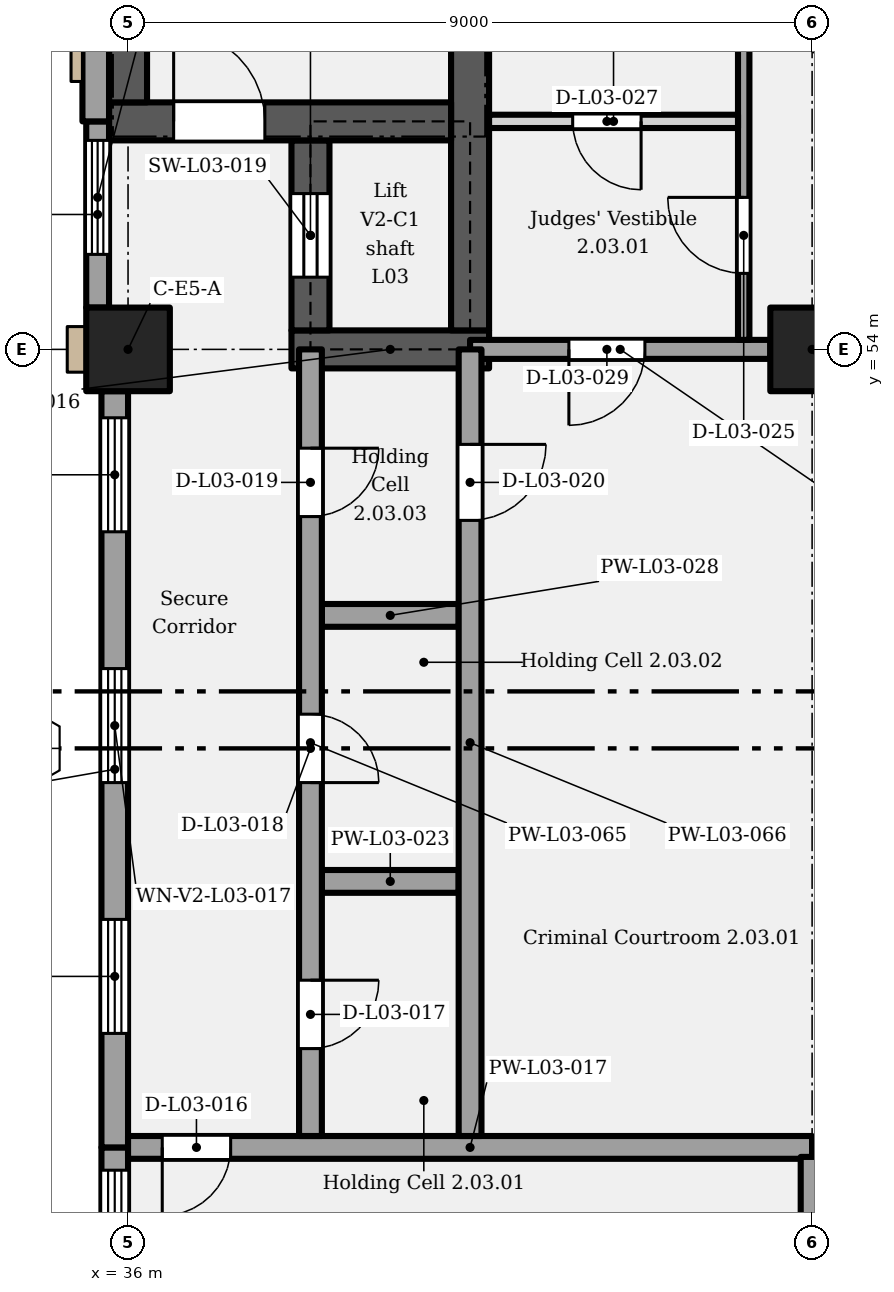
"""IFC4 building model, lengths in metres.
Left out: names, types, materials, properties, quantities, classifications, styles, units other than length and angle.
Written with IfcOpenShell. Run it as: python <this file> out.ifc"""

import sys

from ifc_helpers import new_model, si_unit, direction, frame, frame_2d, origin, origin_2d, place, context, subcontext, project, spatial, rectangle, extrude, element, fill, save


model = new_model("IFC4")
c1 = context("Model", 3, precision=1e-05, world=origin(), true_north=direction((0.0, 1.0)))
c2 = subcontext(c1, "Body", "Model", "MODEL_VIEW")
j1 = project(units=[si_unit("LENGTHUNIT", "METRE"), si_unit("PLANEANGLEUNIT", "RADIAN")], contexts=[c1])
p1 = place(None, origin())
s1 = spatial("IfcSite", under=j1, at=p1, CompositionType="ELEMENT")
p2 = place(p1, origin())
s2 = spatial("IfcBuilding", under=s1, at=p2, CompositionType="ELEMENT")
p3 = place(p2, frame((0.0, 0.0, 17.4)))
s3 = spatial("IfcBuildingStorey", under=s2, at=p3, CompositionType="ELEMENT", Elevation=17.4)
for number, where, z_axis, x_axis in (
    (1, (36.0, 54.0, 0.0), (0.0, 0.0, 1.0), (1.0, 0.0, 0.0)),
    (2, (45.0, 54.0, 0.0), (0.0, 0.0, 1.0), (1.0, 0.0, 0.0)),
):
    element("IfcColumn", number, at=place(p3, frame(where, z_axis=z_axis, x_axis=x_axis)), inside=s3, PredefinedType="COLUMN", context=c2, shape_type="SweptSolid", body=[
        extrude(rectangle(XDim=1.1, YDim=1.1, at=origin_2d()), origin(), (0.0, 0.0, 1.0), 5.4),
    ])
p4 = place(p3, frame((38.15, 54.0, 0.0), z_axis=(0.0, 0.0, 1.0), x_axis=(1.0, 0.0, 0.0)))
e3 = element("IfcWall", 3, at=p4, inside=s3, PredefinedType="SHEAR", context=c2, shape_type="SweptSolid", body=[
    extrude(rectangle(XDim=2.6, YDim=0.5, at=frame_2d((1.3, 0.0))), origin(), (0.0, 0.0, 1.0), 5.15),
])
p5 = place(p3, frame((38.4, 54.25, 0.0), z_axis=(0.0, 0.0, 1.0), x_axis=(0.0, 1.0, 0.0)))
e4 = element("IfcWall", 4, at=p5, inside=s3, PredefinedType="SHEAR", context=c2, shape_type="SweptSolid", body=[
    extrude(rectangle(XDim=2.5, YDim=0.5, at=frame_2d((1.25, 0.0))), origin(), (0.0, 0.0, 1.0), 5.15),
])
p6 = place(p5, frame((0.7, 0.0, 0.0)))
e5 = element("IfcOpeningElement", 5, at=p6, cuts=e4, PredefinedType="OPENING", context=c2, shape_type="SweptSolid", body=[
    extrude(rectangle(XDim=1.1, YDim=2.1, at=frame_2d((0.55, 1.05))), frame((0.0, 0.26, 0.0), z_axis=(0.0, -1.0, 0.0), x_axis=(1.0, 0.0, 0.0)), (0.0, 0.0, 1.0), 0.52),
])
p7 = place(p3, frame((40.5, 54.25, 0.0), z_axis=(0.0, 0.0, 1.0), x_axis=(0.0, 1.0, 0.0)))
e6 = element("IfcWall", 6, at=p7, inside=s3, PredefinedType="SHEAR", context=c2, shape_type="SweptSolid", body=[
    extrude(rectangle(XDim=11.5, YDim=0.5, at=frame_2d((5.75, 0.0))), origin(), (0.0, 0.0, 1.0), 5.15),
])
p8 = place(p3, frame((35.75, 57.0, 0.0), z_axis=(0.0, 0.0, 1.0), x_axis=(1.0, 0.0, 0.0)))
e7 = element("IfcWall", 7, at=p8, inside=s3, PredefinedType="SHEAR", context=c2, shape_type="SweptSolid", body=[
    extrude(rectangle(XDim=4.5, YDim=0.5, at=frame_2d((2.25, 0.0))), origin(), (0.0, 0.0, 1.0), 5.15),
])
p9 = place(p8, frame((0.85, 0.0, 0.0)))
e8 = element("IfcOpeningElement", 8, at=p9, cuts=e7, PredefinedType="OPENING", context=c2, shape_type="SweptSolid", body=[
    extrude(rectangle(XDim=1.2, YDim=2.1, at=frame_2d((0.6, 1.05))), frame((0.0, 0.26, 0.0), z_axis=(0.0, -1.0, 0.0), x_axis=(1.0, 0.0, 0.0)), (0.0, 0.0, 1.0), 0.52),
])
p10 = place(p3, frame((36.0, 57.25, 0.0), z_axis=(0.0, 0.0, 1.0), x_axis=(0.0, 1.0, 0.0)))
e9 = element("IfcWall", 9, at=p10, inside=s3, PredefinedType="SHEAR", context=c2, shape_type="SweptSolid", body=[
    extrude(rectangle(XDim=8.3, YDim=0.5, at=frame_2d((4.15, 0.0))), origin(), (0.0, 0.0, 1.0), 5.15),
])
p11 = place(p3, frame((35.825, 38.05, 0.0), z_axis=(0.0, 0.0, 1.0), x_axis=(0.0, 1.0, 0.0)))
e10 = element("IfcWall", 10, at=p11, inside=s3, PredefinedType="SOLIDWALL", context=c2, shape_type="SweptSolid", body=[
    extrude(rectangle(XDim=5.45, YDim=0.35, at=frame_2d((2.725, 0.0))), origin(), (0.0, 0.0, 1.0), 5.15),
])
p12 = place(p11, frame((0.35, 0.0, 1.05)))
e11 = element("IfcOpeningElement", 11, at=p12, cuts=e10, PredefinedType="OPENING", context=c2, shape_type="SweptSolid", body=[
    extrude(rectangle(XDim=1.5, YDim=3.5, at=frame_2d((0.75, 1.75))), frame((0.0, 0.185, 0.0), z_axis=(0.0, -1.0, 0.0), x_axis=(1.0, 0.0, 0.0)), (0.0, 0.0, 1.0), 0.37),
])
p13 = place(p11, frame((3.65, 0.0, 1.05)))
e12 = element("IfcOpeningElement", 12, at=p13, cuts=e10, PredefinedType="OPENING", context=c2, shape_type="SweptSolid", body=[
    extrude(rectangle(XDim=1.5, YDim=3.5, at=frame_2d((0.75, 1.75))), frame((0.0, 0.185, 0.0), z_axis=(0.0, -1.0, 0.0), x_axis=(1.0, 0.0, 0.0)), (0.0, 0.0, 1.0), 0.37),
])
p14 = place(p3, frame((35.825, 43.5, 0.0), z_axis=(0.0, 0.0, 1.0), x_axis=(0.0, 1.0, 0.0)))
e13 = element("IfcWall", 13, at=p14, inside=s3, PredefinedType="SOLIDWALL", context=c2, shape_type="SweptSolid", body=[
    extrude(rectangle(XDim=9.95, YDim=0.35, at=frame_2d((4.975, 0.0))), origin(), (0.0, 0.0, 1.0), 5.15),
])
p15 = place(p14, frame((1.5, 0.0, 1.05)))
e14 = element("IfcOpeningElement", 14, at=p15, cuts=e13, PredefinedType="OPENING", context=c2, shape_type="SweptSolid", body=[
    extrude(rectangle(XDim=1.5, YDim=3.5, at=frame_2d((0.75, 1.75))), frame((0.0, 0.185, 0.0), z_axis=(0.0, -1.0, 0.0), x_axis=(1.0, 0.0, 0.0)), (0.0, 0.0, 1.0), 0.37),
])
p16 = place(p14, frame((4.8, 0.0, 1.05)))
e15 = element("IfcOpeningElement", 15, at=p16, cuts=e13, PredefinedType="OPENING", context=c2, shape_type="SweptSolid", body=[
    extrude(rectangle(XDim=1.5, YDim=3.5, at=frame_2d((0.75, 1.75))), frame((0.0, 0.185, 0.0), z_axis=(0.0, -1.0, 0.0), x_axis=(1.0, 0.0, 0.0)), (0.0, 0.0, 1.0), 0.37),
])
p17 = place(p14, frame((8.1, 0.0, 1.05)))
e16 = element("IfcOpeningElement", 16, at=p17, cuts=e13, PredefinedType="OPENING", context=c2, shape_type="SweptSolid", body=[
    extrude(rectangle(XDim=1.5, YDim=3.5, at=frame_2d((0.75, 1.75))), frame((0.0, 0.185, 0.0), z_axis=(0.0, -1.0, 0.0), x_axis=(1.0, 0.0, 0.0)), (0.0, 0.0, 1.0), 0.37),
])
p18 = place(p3, frame((35.6, 54.55, 0.0), z_axis=(0.0, 0.0, 1.0), x_axis=(0.0, 1.0, 0.0)))
e17 = element("IfcWall", 17, at=p18, inside=s3, PredefinedType="SOLIDWALL", context=c2, shape_type="SweptSolid", body=[
    extrude(rectangle(XDim=2.45, YDim=0.3, at=frame_2d((1.225, 0.0))), origin(), (0.0, 0.0, 1.0), 5.15),
])
p19 = place(p18, frame((0.7, 0.0, 1.05)))
e18 = element("IfcOpeningElement", 18, at=p19, cuts=e17, PredefinedType="OPENING", context=c2, shape_type="SweptSolid", body=[
    extrude(rectangle(XDim=1.5, YDim=3.5, at=frame_2d((0.75, 1.75))), frame((0.0, 0.16, 0.0), z_axis=(0.0, -1.0, 0.0), x_axis=(1.0, 0.0, 0.0)), (0.0, 0.0, 1.0), 0.32),
])
p20 = place(p3, frame((35.575, 57.0, 0.0), z_axis=(0.0, 0.0, 1.0), x_axis=(0.0, 1.0, 0.0)))
e19 = element("IfcWall", 19, at=p20, inside=s3, PredefinedType="SOLIDWALL", context=c2, shape_type="SweptSolid", body=[
    extrude(rectangle(XDim=8.55, YDim=0.35, at=frame_2d((4.275, 0.0))), origin(), (0.0, 0.0, 1.0), 5.15),
])
p21 = place(p3, frame((36.0, 43.5, 0.0), z_axis=(0.0, 0.0, 1.0), x_axis=(1.0, 0.0, 0.0)))
e20 = element("IfcWall", 20, at=p21, inside=s3, PredefinedType="PARTITIONING", context=c2, shape_type="SweptSolid", body=[
    extrude(rectangle(XDim=9.0, YDim=0.3, at=frame_2d((4.5, 0.0))), origin(), (0.0, 0.0, 1.0), 5.15),
])
p22 = place(p21, frame((1.35, 0.0, 0.0), z_axis=(0.0, 0.0, 1.0), x_axis=(-1.0, 0.0, 0.0)))
e21 = element("IfcOpeningElement", 21, at=p22, cuts=e20, PredefinedType="OPENING", context=c2, shape_type="SweptSolid", body=[
    extrude(rectangle(XDim=0.9, YDim=2.1, at=frame_2d((0.45, 1.05))), frame((0.0, 0.16, 0.0), z_axis=(0.0, -1.0, 0.0), x_axis=(1.0, 0.0, 0.0)), (0.0, 0.0, 1.0), 0.32),
])
p23 = place(p3, frame((45.0, 43.5, 0.0), z_axis=(0.0, 0.0, 1.0), x_axis=(1.0, 0.0, 0.0)))
e22 = element("IfcWall", 22, at=p23, inside=s3, PredefinedType="PARTITIONING", context=c2, shape_type="SweptSolid", body=[
    extrude(rectangle(XDim=4.625, YDim=0.25, at=frame_2d((2.312, 0.0))), origin(), (0.0, 0.0, 1.0), 5.15),
])
for number, where, z_axis, x_axis in (
    (23, (38.55, 47.0, 0.0), (0.0, 0.0, 1.0), (1.0, 0.0, 0.0)),
    (24, (38.55, 50.5, 0.0), (0.0, 0.0, 1.0), (1.0, 0.0, 0.0)),
):
    element("IfcWall", number, at=place(p3, frame(where, z_axis=z_axis, x_axis=x_axis)), inside=s3, PredefinedType="PARTITIONING", context=c2, shape_type="SweptSolid", body=[
        extrude(rectangle(XDim=1.8, YDim=0.3, at=frame_2d((0.9, 0.0))), origin(), (0.0, 0.0, 1.0), 5.15),
    ])
p24 = place(p3, frame((40.5, 54.0, 0.0), z_axis=(0.0, 0.0, 1.0), x_axis=(1.0, 0.0, 0.0)))
e25 = element("IfcWall", 25, at=p24, inside=s3, PredefinedType="PARTITIONING", context=c2, shape_type="SweptSolid", body=[
    extrude(rectangle(XDim=3.95, YDim=0.25, at=frame_2d((1.975, 0.0))), origin(), (0.0, 0.0, 1.0), 4.4),
])
p25 = place(p24, frame((2.3, 0.0, 0.0), z_axis=(0.0, 0.0, 1.0), x_axis=(-1.0, 0.0, 0.0)))
e26 = element("IfcOpeningElement", 26, at=p25, cuts=e25, PredefinedType="OPENING", context=c2, shape_type="SweptSolid", body=[
    extrude(rectangle(XDim=1.0, YDim=2.1, at=frame_2d((0.5, 1.05))), frame((0.0, 0.135, 0.0), z_axis=(0.0, -1.0, 0.0), x_axis=(1.0, 0.0, 0.0)), (0.0, 0.0, 1.0), 0.27),
])
p26 = place(p3, frame((40.75, 57.0, 0.0), z_axis=(0.0, 0.0, 1.0), x_axis=(1.0, 0.0, 0.0)))
e27 = element("IfcWall", 27, at=p26, inside=s3, PredefinedType="PARTITIONING", context=c2, shape_type="SweptSolid", body=[
    extrude(rectangle(XDim=3.275, YDim=0.175, at=frame_2d((1.637, 0.0))), origin(), (0.0, 0.0, 1.0), 5.15),
])
p27 = place(p26, frame((2.0, 0.0, 0.0), z_axis=(0.0, 0.0, 1.0), x_axis=(-1.0, 0.0, 0.0)))
e28 = element("IfcOpeningElement", 28, at=p27, cuts=e27, PredefinedType="OPENING", context=c2, shape_type="SweptSolid", body=[
    extrude(rectangle(XDim=0.9, YDim=2.1, at=frame_2d((0.45, 1.05))), frame((0.0, 0.097, 0.0), z_axis=(0.0, -1.0, 0.0), x_axis=(1.0, 0.0, 0.0)), (0.0, 0.0, 1.0), 0.195),
])
p28 = place(p3, frame((38.4, 43.65, 0.0), z_axis=(0.0, 0.0, 1.0), x_axis=(0.0, 1.0, 0.0)))
e29 = element("IfcWall", 29, at=p28, inside=s3, PredefinedType="PARTITIONING", context=c2, shape_type="SweptSolid", body=[
    extrude(rectangle(XDim=10.35, YDim=0.3, at=frame_2d((5.175, 0.0))), origin(), (0.0, 0.0, 1.0), 5.15),
])
p29 = place(p28, frame((2.05, 0.0, 0.0), z_axis=(0.0, 0.0, 1.0), x_axis=(-1.0, 0.0, 0.0)))
e30 = element("IfcOpeningElement", 30, at=p29, cuts=e29, PredefinedType="OPENING", context=c2, shape_type="SweptSolid", body=[
    extrude(rectangle(XDim=0.9, YDim=2.0, at=frame_2d((0.45, 1.0))), frame((0.0, 0.16, 0.0), z_axis=(0.0, -1.0, 0.0), x_axis=(1.0, 0.0, 0.0)), (0.0, 0.0, 1.0), 0.32),
])
p30 = place(p28, frame((5.55, 0.0, 0.0), z_axis=(0.0, 0.0, 1.0), x_axis=(-1.0, 0.0, 0.0)))
e31 = element("IfcOpeningElement", 31, at=p30, cuts=e29, PredefinedType="OPENING", context=c2, shape_type="SweptSolid", body=[
    extrude(rectangle(XDim=0.9, YDim=2.0, at=frame_2d((0.45, 1.0))), frame((0.0, 0.16, 0.0), z_axis=(0.0, -1.0, 0.0), x_axis=(1.0, 0.0, 0.0)), (0.0, 0.0, 1.0), 0.32),
])
p31 = place(p28, frame((9.05, 0.0, 0.0), z_axis=(0.0, 0.0, 1.0), x_axis=(-1.0, 0.0, 0.0)))
e32 = element("IfcOpeningElement", 32, at=p31, cuts=e29, PredefinedType="OPENING", context=c2, shape_type="SweptSolid", body=[
    extrude(rectangle(XDim=0.9, YDim=2.0, at=frame_2d((0.45, 1.0))), frame((0.0, 0.16, 0.0), z_axis=(0.0, -1.0, 0.0), x_axis=(1.0, 0.0, 0.0)), (0.0, 0.0, 1.0), 0.32),
])
p32 = place(p3, frame((40.5, 43.65, 0.0), z_axis=(0.0, 0.0, 1.0), x_axis=(0.0, 1.0, 0.0)))
e33 = element("IfcWall", 33, at=p32, inside=s3, PredefinedType="PARTITIONING", context=c2, shape_type="SweptSolid", body=[
    extrude(rectangle(XDim=10.35, YDim=0.3, at=frame_2d((5.175, 0.0))), origin(), (0.0, 0.0, 1.0), 5.15),
])
p33 = place(p32, frame((9.1, 0.0, 0.0), z_axis=(0.0, 0.0, 1.0), x_axis=(-1.0, 0.0, 0.0)))
e34 = element("IfcOpeningElement", 34, at=p33, cuts=e33, PredefinedType="OPENING", context=c2, shape_type="SweptSolid", body=[
    extrude(rectangle(XDim=1.0, YDim=2.0, at=frame_2d((0.5, 1.0))), frame((0.0, 0.16, 0.0), z_axis=(0.0, -1.0, 0.0), x_axis=(1.0, 0.0, 0.0)), (0.0, 0.0, 1.0), 0.32),
])
p34 = place(p3, frame((44.1, 54.125, 0.0), z_axis=(0.0, 0.0, 1.0), x_axis=(0.0, 1.0, 0.0)))
e35 = element("IfcWall", 35, at=p34, inside=s3, PredefinedType="PARTITIONING", context=c2, shape_type="SweptSolid", body=[
    extrude(rectangle(XDim=8.8, YDim=0.15, at=frame_2d((4.4, 0.0))), origin(), (0.0, 0.0, 1.0), 5.15),
])
p35 = place(p34, frame((0.875, 0.0, 0.0)))
e36 = element("IfcOpeningElement", 36, at=p35, cuts=e35, PredefinedType="OPENING", context=c2, shape_type="SweptSolid", body=[
    extrude(rectangle(XDim=1.0, YDim=2.1, at=frame_2d((0.5, 1.05))), frame((0.0, 0.085, 0.0), z_axis=(0.0, -1.0, 0.0), x_axis=(1.0, 0.0, 0.0)), (0.0, 0.0, 1.0), 0.17),
])
p36 = place(p34, frame((5.425, 0.0, 0.0)))
e37 = element("IfcOpeningElement", 37, at=p36, cuts=e35, PredefinedType="OPENING", context=c2, shape_type="SweptSolid", body=[
    extrude(rectangle(XDim=0.9, YDim=2.1, at=frame_2d((0.45, 1.05))), frame((0.0, 0.085, 0.0), z_axis=(0.0, -1.0, 0.0), x_axis=(1.0, 0.0, 0.0)), (0.0, 0.0, 1.0), 0.17),
])
p37 = place(p3, frame((45.0, 38.05, 0.0), z_axis=(0.0, 0.0, 1.0), x_axis=(0.0, 1.0, 0.0)))
e38 = element("IfcWall", 38, at=p37, inside=s3, PredefinedType="PARTITIONING", context=c2, shape_type="SweptSolid", body=[
    extrude(rectangle(XDim=5.325, YDim=0.3, at=frame_2d((2.663, 0.0))), origin(), (0.0, 0.0, 1.0), 4.2),
])
p38 = place(p13, origin())
e39 = element("IfcWindow", 39, at=p38, inside=s3, PartitioningType="SINGLE_PANEL", PredefinedType="WINDOW", context=c2, shape_type="SweptSolid", body=[
    extrude(rectangle(XDim=1.5, YDim=3.5, at=frame_2d((0.75, 1.75))), frame((0.0, 0.03, 0.0), z_axis=(0.0, -1.0, 0.0), x_axis=(1.0, 0.0, 0.0)), (0.0, 0.0, 1.0), 0.06),
])
fill(e12, e39)
p39 = place(p15, origin())
e40 = element("IfcWindow", 40, at=p39, inside=s3, PartitioningType="SINGLE_PANEL", PredefinedType="WINDOW", context=c2, shape_type="SweptSolid", body=[
    extrude(rectangle(XDim=1.5, YDim=3.5, at=frame_2d((0.75, 1.75))), frame((0.0, 0.03, 0.0), z_axis=(0.0, -1.0, 0.0), x_axis=(1.0, 0.0, 0.0)), (0.0, 0.0, 1.0), 0.06),
])
fill(e14, e40)
p40 = place(p16, origin())
e41 = element("IfcWindow", 41, at=p40, inside=s3, PartitioningType="SINGLE_PANEL", PredefinedType="WINDOW", context=c2, shape_type="SweptSolid", body=[
    extrude(rectangle(XDim=1.5, YDim=3.5, at=frame_2d((0.75, 1.75))), frame((0.0, 0.03, 0.0), z_axis=(0.0, -1.0, 0.0), x_axis=(1.0, 0.0, 0.0)), (0.0, 0.0, 1.0), 0.06),
])
fill(e15, e41)
p41 = place(p17, origin())
e42 = element("IfcWindow", 42, at=p41, inside=s3, PartitioningType="SINGLE_PANEL", PredefinedType="WINDOW", context=c2, shape_type="SweptSolid", body=[
    extrude(rectangle(XDim=1.5, YDim=3.5, at=frame_2d((0.75, 1.75))), frame((0.0, 0.03, 0.0), z_axis=(0.0, -1.0, 0.0), x_axis=(1.0, 0.0, 0.0)), (0.0, 0.0, 1.0), 0.06),
])
fill(e16, e42)
p42 = place(p19, origin())
e43 = element("IfcWindow", 43, at=p42, inside=s3, PartitioningType="SINGLE_PANEL", PredefinedType="WINDOW", context=c2, shape_type="SweptSolid", body=[
    extrude(rectangle(XDim=1.5, YDim=3.5, at=frame_2d((0.75, 1.75))), frame((0.0, 0.03, 0.0), z_axis=(0.0, -1.0, 0.0), x_axis=(1.0, 0.0, 0.0)), (0.0, 0.0, 1.0), 0.06),
])
fill(e18, e43)
p43 = place(p6, origin())
e44 = element("IfcDoor", 44, at=p43, inside=s3, OperationType="SLIDING_TO_LEFT", PredefinedType="DOOR", context=c2, shape_type="SweptSolid", body=[
    extrude(rectangle(XDim=1.1, YDim=2.1, at=frame_2d((0.55, 1.05))), frame((0.0, 0.025, 0.0), z_axis=(0.0, -1.0, 0.0), x_axis=(1.0, 0.0, 0.0)), (0.0, 0.0, 1.0), 0.05),
])
fill(e5, e44)
p44 = place(p9, origin())
e45 = element("IfcDoor", 45, at=p44, inside=s3, OperationType="SINGLE_SWING_LEFT", PredefinedType="DOOR", context=c2, shape_type="SweptSolid", body=[
    extrude(rectangle(XDim=1.2, YDim=2.1, at=frame_2d((0.6, 1.05))), frame((0.0, 0.025, 0.0), z_axis=(0.0, -1.0, 0.0), x_axis=(1.0, 0.0, 0.0)), (0.0, 0.0, 1.0), 0.05),
])
fill(e8, e45)
p45 = place(p22, origin())
e46 = element("IfcDoor", 46, at=p45, inside=s3, OperationType="SINGLE_SWING_RIGHT", PredefinedType="DOOR", context=c2, shape_type="SweptSolid", body=[
    extrude(rectangle(XDim=0.9, YDim=2.1, at=frame_2d((0.45, 1.05))), frame((0.0, 0.025, 0.0), z_axis=(0.0, -1.0, 0.0), x_axis=(1.0, 0.0, 0.0)), (0.0, 0.0, 1.0), 0.05),
])
fill(e21, e46)
p46 = place(p29, origin())
e47 = element("IfcDoor", 47, at=p46, inside=s3, OperationType="SINGLE_SWING_LEFT", PredefinedType="DOOR", context=c2, shape_type="SweptSolid", body=[
    extrude(rectangle(XDim=0.9, YDim=2.0, at=frame_2d((0.45, 1.0))), frame((0.0, 0.025, 0.0), z_axis=(0.0, -1.0, 0.0), x_axis=(1.0, 0.0, 0.0)), (0.0, 0.0, 1.0), 0.05),
])
fill(e30, e47)
p47 = place(p30, origin())
e48 = element("IfcDoor", 48, at=p47, inside=s3, OperationType="SINGLE_SWING_RIGHT", PredefinedType="DOOR", context=c2, shape_type="SweptSolid", body=[
    extrude(rectangle(XDim=0.9, YDim=2.0, at=frame_2d((0.45, 1.0))), frame((0.0, 0.025, 0.0), z_axis=(0.0, -1.0, 0.0), x_axis=(1.0, 0.0, 0.0)), (0.0, 0.0, 1.0), 0.05),
])
fill(e31, e48)
p48 = place(p31, origin())
e49 = element("IfcDoor", 49, at=p48, inside=s3, OperationType="SINGLE_SWING_LEFT", PredefinedType="DOOR", context=c2, shape_type="SweptSolid", body=[
    extrude(rectangle(XDim=0.9, YDim=2.0, at=frame_2d((0.45, 1.0))), frame((0.0, 0.025, 0.0), z_axis=(0.0, -1.0, 0.0), x_axis=(1.0, 0.0, 0.0)), (0.0, 0.0, 1.0), 0.05),
])
fill(e32, e49)
p49 = place(p33, origin())
e50 = element("IfcDoor", 50, at=p49, inside=s3, OperationType="SINGLE_SWING_LEFT", PredefinedType="DOOR", context=c2, shape_type="SweptSolid", body=[
    extrude(rectangle(XDim=1.0, YDim=2.0, at=frame_2d((0.5, 1.0))), frame((0.0, 0.025, 0.0), z_axis=(0.0, -1.0, 0.0), x_axis=(1.0, 0.0, 0.0)), (0.0, 0.0, 1.0), 0.05),
])
fill(e34, e50)
p50 = place(p35, origin())
e51 = element("IfcDoor", 51, at=p50, inside=s3, OperationType="SINGLE_SWING_RIGHT", PredefinedType="DOOR", context=c2, shape_type="SweptSolid", body=[
    extrude(rectangle(XDim=1.0, YDim=2.1, at=frame_2d((0.5, 1.05))), frame((0.0, 0.025, 0.0), z_axis=(0.0, -1.0, 0.0), x_axis=(1.0, 0.0, 0.0)), (0.0, 0.0, 1.0), 0.05),
])
fill(e36, e51)
p51 = place(p27, origin())
e52 = element("IfcDoor", 52, at=p51, inside=s3, OperationType="SINGLE_SWING_LEFT", PredefinedType="DOOR", context=c2, shape_type="SweptSolid", body=[
    extrude(rectangle(XDim=0.9, YDim=2.1, at=frame_2d((0.45, 1.05))), frame((0.0, 0.025, 0.0), z_axis=(0.0, -1.0, 0.0), x_axis=(1.0, 0.0, 0.0)), (0.0, 0.0, 1.0), 0.05),
])
fill(e28, e52)
p52 = place(p25, origin())
e53 = element("IfcDoor", 53, at=p52, inside=s3, OperationType="SINGLE_SWING_RIGHT", PredefinedType="DOOR", context=c2, shape_type="SweptSolid", body=[
    extrude(rectangle(XDim=1.0, YDim=2.1, at=frame_2d((0.5, 1.05))), frame((0.0, 0.025, 0.0), z_axis=(0.0, -1.0, 0.0), x_axis=(1.0, 0.0, 0.0)), (0.0, 0.0, 1.0), 0.05),
])
fill(e26, e53)
save(model, sys.argv[1])
